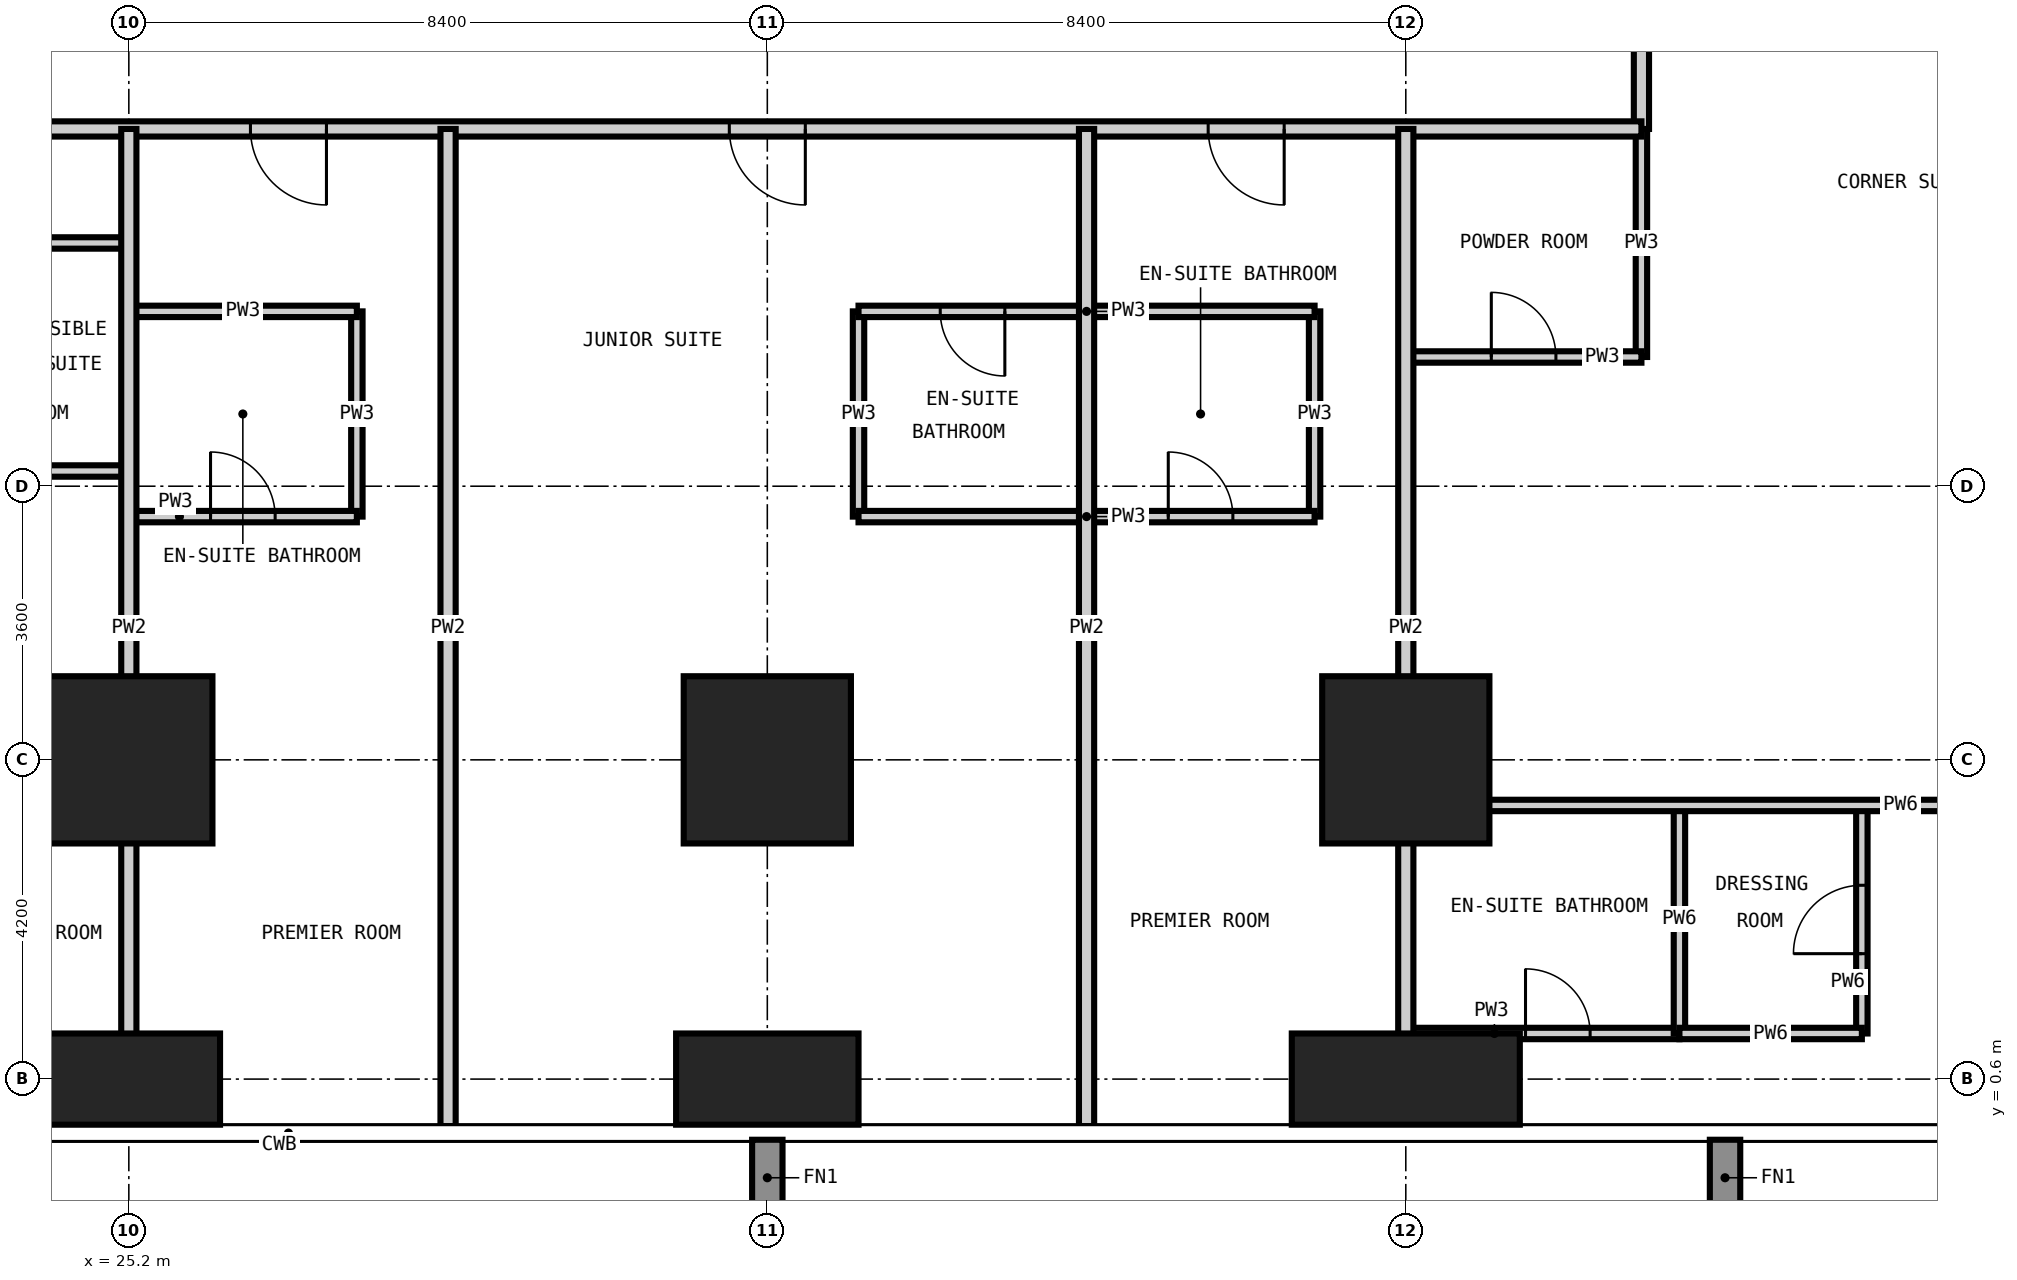
"""IFC4 building model, lengths in metres.
Left out: names, types, materials, properties, quantities, classifications, styles, units other than length and angle.
Written with IfcOpenShell. Run it as: python <this file> out.ifc"""

import sys

from ifc_helpers import new_model, si_unit, direction, frame, frame_2d, origin, origin_2d, place, context, subcontext, project, spatial, rectangle, extrude, element, fill, save


model = new_model("IFC4")
c1 = context("Model", 3, precision=1e-05, world=origin(), true_north=direction((0.0, 1.0)))
c2 = subcontext(c1, "Body", "Model", "MODEL_VIEW")
j1 = project(units=[si_unit("LENGTHUNIT", "METRE"), si_unit("PLANEANGLEUNIT", "RADIAN")], contexts=[c1])
p1 = place(None, origin())
s1 = spatial("IfcSite", under=j1, at=p1, CompositionType="ELEMENT")
p2 = place(p1, origin())
s2 = spatial("IfcBuilding", under=s1, at=p2, CompositionType="ELEMENT")
p3 = place(p2, frame((0.0, 0.0, 144.0)))
s3 = spatial("IfcBuildingStorey", under=s2, at=p3, CompositionType="ELEMENT", Elevation=144.0)
p4 = place(p3, frame((25.2, 0.6, -0.35), z_axis=(0.0, 0.0, 1.0), x_axis=(1.0, 0.0, 0.0)))
e1 = element("IfcColumn", 1, at=p4, inside=s3, PredefinedType="COLUMN", context=c2, shape_type="SweptSolid", body=[
    extrude(rectangle(XDim=2.4, YDim=1.2, at=origin_2d()), origin(), (0.0, 0.0, 1.0), 3.6),
])
p5 = place(p3, frame((25.2, 4.8, -0.35), z_axis=(0.0, 0.0, 1.0), x_axis=(1.0, 0.0, 0.0)))
e2 = element("IfcColumn", 2, at=p5, inside=s3, PredefinedType="COLUMN", context=c2, shape_type="SweptSolid", body=[
    extrude(rectangle(XDim=2.2, YDim=2.2, at=origin_2d()), origin(), (0.0, 0.0, 1.0), 3.6),
])
p6 = place(p3, frame((33.6, 0.6, -0.35), z_axis=(0.0, 0.0, 1.0), x_axis=(1.0, 0.0, 0.0)))
e3 = element("IfcColumn", 3, at=p6, inside=s3, PredefinedType="COLUMN", context=c2, shape_type="SweptSolid", body=[
    extrude(rectangle(XDim=2.4, YDim=1.2, at=origin_2d()), origin(), (0.0, 0.0, 1.0), 3.6),
])
p7 = place(p3, frame((33.6, 4.8, -0.35), z_axis=(0.0, 0.0, 1.0), x_axis=(1.0, 0.0, 0.0)))
e4 = element("IfcColumn", 4, at=p7, inside=s3, PredefinedType="COLUMN", context=c2, shape_type="SweptSolid", body=[
    extrude(rectangle(XDim=2.2, YDim=2.2, at=origin_2d()), origin(), (0.0, 0.0, 1.0), 3.6),
])
p8 = place(p3, frame((42.0, 0.6, -0.35), z_axis=(0.0, 0.0, 1.0), x_axis=(1.0, 0.0, 0.0)))
e5 = element("IfcColumn", 5, at=p8, inside=s3, PredefinedType="COLUMN", context=c2, shape_type="SweptSolid", body=[
    extrude(rectangle(XDim=3.0, YDim=1.2, at=origin_2d()), origin(), (0.0, 0.0, 1.0), 3.6),
])
p9 = place(p3, frame((42.0, 4.8, -0.35), z_axis=(0.0, 0.0, 1.0), x_axis=(1.0, 0.0, 0.0)))
e6 = element("IfcColumn", 6, at=p9, inside=s3, PredefinedType="COLUMN", context=c2, shape_type="SweptSolid", body=[
    extrude(rectangle(XDim=2.2, YDim=2.2, at=origin_2d()), origin(), (0.0, 0.0, 1.0), 3.6),
])
for number, where, z_axis, x_axis in (
    (7, (28.2, 8.0, 0.0), (0.0, 0.0, 1.0), (0.0, 1.0, 0.0)),
    (8, (34.8, 8.0, 0.0), (0.0, 0.0, 1.0), (0.0, 1.0, 0.0)),
    (9, (40.8, 8.0, 0.0), (0.0, 0.0, 1.0), (0.0, 1.0, 0.0)),
):
    element("IfcWall", number, at=place(p3, frame(where, z_axis=z_axis, x_axis=x_axis)), inside=s3, PredefinedType="PARTITIONING", context=c2, shape_type="SweptSolid", body=[
        extrude(rectangle(XDim=2.7, YDim=0.15, at=frame_2d((1.35, 0.0))), origin(), (0.0, 0.0, 1.0), 3.25),
    ])
p10 = place(p3, frame((45.1, 10.1, 0.0), z_axis=(0.0, 0.0, 1.0), x_axis=(0.0, 1.0, 0.0)))
e10 = element("IfcWall", 10, at=p10, inside=s3, PredefinedType="PARTITIONING", context=c2, shape_type="SweptSolid", body=[
    extrude(rectangle(XDim=3.0, YDim=0.15, at=frame_2d((1.5, 0.0))), origin(), (0.0, 0.0, 1.0), 3.25),
])
p11 = place(p3, frame((42.0, 1.2, 0.0), z_axis=(0.0, 0.0, 1.0), x_axis=(1.0, 0.0, 0.0)))
e11 = element("IfcWall", 11, at=p11, inside=s3, PredefinedType="PARTITIONING", context=c2, shape_type="SweptSolid", body=[
    extrude(rectangle(XDim=3.6, YDim=0.15, at=frame_2d((1.8, 0.0))), origin(), (0.0, 0.0, 1.0), 3.25),
])
p12 = place(p11, frame((1.575, 0.0, 0.0)))
e12 = element("IfcOpeningElement", 12, at=p12, cuts=e11, PredefinedType="OPENING", context=c2, shape_type="SweptSolid", body=[
    extrude(rectangle(XDim=0.85, YDim=2.1, at=frame_2d((0.425, 1.05))), frame((0.0, 0.085, 0.0), z_axis=(0.0, -1.0, 0.0), x_axis=(1.0, 0.0, 0.0)), (0.0, 0.0, 1.0), 0.17),
])
p13 = place(p3, frame((25.2, 8.0, 0.0), z_axis=(0.0, 0.0, 1.0), x_axis=(1.0, 0.0, 0.0)))
e13 = element("IfcWall", 13, at=p13, inside=s3, PredefinedType="PARTITIONING", context=c2, shape_type="SweptSolid", body=[
    extrude(rectangle(XDim=3.0, YDim=0.15, at=frame_2d((1.5, 0.0))), origin(), (0.0, 0.0, 1.0), 3.25),
])
p14 = place(p13, frame((1.075, 0.0, 0.0)))
e14 = element("IfcOpeningElement", 14, at=p14, cuts=e13, PredefinedType="OPENING", context=c2, shape_type="SweptSolid", body=[
    extrude(rectangle(XDim=0.85, YDim=2.1, at=frame_2d((0.425, 1.05))), frame((0.0, 0.085, 0.0), z_axis=(0.0, -1.0, 0.0), x_axis=(1.0, 0.0, 0.0)), (0.0, 0.0, 1.0), 0.17),
])
p15 = place(p3, frame((34.8, 8.0, 0.0), z_axis=(0.0, 0.0, 1.0), x_axis=(1.0, 0.0, 0.0)))
e15 = element("IfcWall", 15, at=p15, inside=s3, PredefinedType="PARTITIONING", context=c2, shape_type="SweptSolid", body=[
    extrude(rectangle(XDim=6.0, YDim=0.15, at=frame_2d((3.0, 0.0))), origin(), (0.0, 0.0, 1.0), 3.25),
])
p16 = place(p15, frame((4.075, 0.0, 0.0)))
e16 = element("IfcOpeningElement", 16, at=p16, cuts=e15, PredefinedType="OPENING", context=c2, shape_type="SweptSolid", body=[
    extrude(rectangle(XDim=0.85, YDim=2.1, at=frame_2d((0.425, 1.05))), frame((0.0, 0.085, 0.0), z_axis=(0.0, -1.0, 0.0), x_axis=(1.0, 0.0, 0.0)), (0.0, 0.0, 1.0), 0.17),
])
p17 = place(p3, frame((22.5, 8.6, 0.0), z_axis=(0.0, 0.0, 1.0), x_axis=(1.0, 0.0, 0.0)))
e17 = element("IfcWall", 17, at=p17, inside=s3, PredefinedType="PARTITIONING", context=c2, shape_type="SweptSolid", body=[
    extrude(rectangle(XDim=2.7, YDim=0.15, at=frame_2d((1.35, 0.0))), origin(), (0.0, 0.0, 1.0), 3.25),
])
p18 = place(p3, frame((42.0, 10.1, 0.0), z_axis=(0.0, 0.0, 1.0), x_axis=(1.0, 0.0, 0.0)))
e18 = element("IfcWall", 18, at=p18, inside=s3, PredefinedType="PARTITIONING", context=c2, shape_type="SweptSolid", body=[
    extrude(rectangle(XDim=3.1, YDim=0.15, at=frame_2d((1.55, 0.0))), origin(), (0.0, 0.0, 1.0), 3.25),
])
p19 = place(p18, frame((1.125, 0.0, 0.0)))
e19 = element("IfcOpeningElement", 19, at=p19, cuts=e18, PredefinedType="OPENING", context=c2, shape_type="SweptSolid", body=[
    extrude(rectangle(XDim=0.85, YDim=2.1, at=frame_2d((0.425, 1.05))), frame((0.0, 0.085, 0.0), z_axis=(0.0, -1.0, 0.0), x_axis=(1.0, 0.0, 0.0)), (0.0, 0.0, 1.0), 0.17),
])
p20 = place(p3, frame((25.2, 10.7, 0.0), z_axis=(0.0, 0.0, 1.0), x_axis=(1.0, 0.0, 0.0)))
e20 = element("IfcWall", 20, at=p20, inside=s3, PredefinedType="PARTITIONING", context=c2, shape_type="SweptSolid", body=[
    extrude(rectangle(XDim=3.0, YDim=0.15, at=frame_2d((1.5, 0.0))), origin(), (0.0, 0.0, 1.0), 3.25),
])
p21 = place(p3, frame((34.8, 10.7, 0.0), z_axis=(0.0, 0.0, 1.0), x_axis=(1.0, 0.0, 0.0)))
e21 = element("IfcWall", 21, at=p21, inside=s3, PredefinedType="PARTITIONING", context=c2, shape_type="SweptSolid", body=[
    extrude(rectangle(XDim=6.0, YDim=0.15, at=frame_2d((3.0, 0.0))), origin(), (0.0, 0.0, 1.0), 3.25),
])
p22 = place(p21, frame((1.075, 0.0, 0.0)))
e22 = element("IfcOpeningElement", 22, at=p22, cuts=e21, PredefinedType="OPENING", context=c2, shape_type="SweptSolid", body=[
    extrude(rectangle(XDim=0.85, YDim=2.1, at=frame_2d((0.425, 1.05))), frame((0.0, 0.085, 0.0), z_axis=(0.0, -1.0, 0.0), x_axis=(1.0, 0.0, 0.0)), (0.0, 0.0, 1.0), 0.17),
])
p23 = place(p3, frame((22.5, 11.6, 0.0), z_axis=(0.0, 0.0, 1.0), x_axis=(1.0, 0.0, 0.0)))
e23 = element("IfcWall", 23, at=p23, inside=s3, PredefinedType="PARTITIONING", context=c2, shape_type="SweptSolid", body=[
    extrude(rectangle(XDim=2.7, YDim=0.15, at=frame_2d((1.35, 0.0))), origin(), (0.0, 0.0, 1.0), 3.25),
])
p24 = place(p3, frame((45.1, 44.5, 0.0), z_axis=(0.0, 0.0, 1.0), x_axis=(0.0, -1.0, 0.0)))
e24 = element("IfcWall", 24, at=p24, inside=s3, PredefinedType="PARTITIONING", context=c2, shape_type="SweptSolid", body=[
    extrude(rectangle(XDim=31.4, YDim=0.2, at=frame_2d((15.7, 0.0))), origin(), (0.0, 0.0, 1.0), 3.25),
])
p25 = place(p24, frame((24.2, 0.0, 0.0)))
e25 = element("IfcOpeningElement", 25, at=p25, cuts=e24, PredefinedType="OPENING", context=c2, shape_type="SweptSolid", body=[
    extrude(rectangle(XDim=1.0, YDim=2.2, at=frame_2d((0.5, 1.1))), frame((0.0, 0.11, 0.0), z_axis=(0.0, -1.0, 0.0), x_axis=(1.0, 0.0, 0.0)), (0.0, 0.0, 1.0), 0.22),
])
p26 = place(p24, frame((13.4, 0.0, 0.0)))
e26 = element("IfcOpeningElement", 26, at=p26, cuts=e24, PredefinedType="OPENING", context=c2, shape_type="SweptSolid", body=[
    extrude(rectangle(XDim=1.0, YDim=2.2, at=frame_2d((0.5, 1.1))), frame((0.0, 0.11, 0.0), z_axis=(0.0, -1.0, 0.0), x_axis=(1.0, 0.0, 0.0)), (0.0, 0.0, 1.0), 0.22),
])
p27 = place(p24, frame((7.4, 0.0, 0.0)))
e27 = element("IfcOpeningElement", 27, at=p27, cuts=e24, PredefinedType="OPENING", context=c2, shape_type="SweptSolid", body=[
    extrude(rectangle(XDim=1.0, YDim=2.2, at=frame_2d((0.5, 1.1))), frame((0.0, 0.11, 0.0), z_axis=(0.0, -1.0, 0.0), x_axis=(1.0, 0.0, 0.0)), (0.0, 0.0, 1.0), 0.22),
])
p28 = place(p24, frame((29.05, 0.0, 0.0)))
e28 = element("IfcOpeningElement", 28, at=p28, cuts=e24, PredefinedType="OPENING", context=c2, shape_type="SweptSolid", body=[
    extrude(rectangle(XDim=1.0, YDim=2.2, at=frame_2d((0.5, 1.1))), frame((0.0, 0.11, 0.0), z_axis=(0.0, -1.0, 0.0), x_axis=(1.0, 0.0, 0.0)), (0.0, 0.0, 1.0), 0.22),
])
p29 = place(p24, frame((0.75, 0.0, 0.0)))
e29 = element("IfcOpeningElement", 29, at=p29, cuts=e24, PredefinedType="OPENING", context=c2, shape_type="SweptSolid", body=[
    extrude(rectangle(XDim=1.0, YDim=2.2, at=frame_2d((0.5, 1.1))), frame((0.0, 0.11, 0.0), z_axis=(0.0, -1.0, 0.0), x_axis=(1.0, 0.0, 0.0)), (0.0, 0.0, 1.0), 0.22),
])
p30 = place(p3, frame((45.1, 13.1, 0.0), z_axis=(0.0, 0.0, 1.0), x_axis=(-1.0, 0.0, 0.0)))
e30 = element("IfcWall", 30, at=p30, inside=s3, PredefinedType="PARTITIONING", context=c2, shape_type="SweptSolid", body=[
    extrude(rectangle(XDim=24.1, YDim=0.2, at=frame_2d((12.05, 0.0))), origin(), (0.0, 0.0, 1.0), 3.25),
])
p31 = place(p30, frame((21.5, 0.0, 0.0)))
e31 = element("IfcOpeningElement", 31, at=p31, cuts=e30, PredefinedType="OPENING", context=c2, shape_type="SweptSolid", body=[
    extrude(rectangle(XDim=1.0, YDim=2.2, at=frame_2d((0.5, 1.1))), frame((0.0, 0.11, 0.0), z_axis=(0.0, -1.0, 0.0), x_axis=(1.0, 0.0, 0.0)), (0.0, 0.0, 1.0), 0.22),
])
p32 = place(p30, frame((17.3, 0.0, 0.0)))
e32 = element("IfcOpeningElement", 32, at=p32, cuts=e30, PredefinedType="OPENING", context=c2, shape_type="SweptSolid", body=[
    extrude(rectangle(XDim=1.0, YDim=2.2, at=frame_2d((0.5, 1.1))), frame((0.0, 0.11, 0.0), z_axis=(0.0, -1.0, 0.0), x_axis=(1.0, 0.0, 0.0)), (0.0, 0.0, 1.0), 0.22),
])
p33 = place(p30, frame((11.0, 0.0, 0.0)))
e33 = element("IfcOpeningElement", 33, at=p33, cuts=e30, PredefinedType="OPENING", context=c2, shape_type="SweptSolid", body=[
    extrude(rectangle(XDim=1.0, YDim=2.2, at=frame_2d((0.5, 1.1))), frame((0.0, 0.11, 0.0), z_axis=(0.0, -1.0, 0.0), x_axis=(1.0, 0.0, 0.0)), (0.0, 0.0, 1.0), 0.22),
])
p34 = place(p30, frame((4.7, 0.0, 0.0)))
e34 = element("IfcOpeningElement", 34, at=p34, cuts=e30, PredefinedType="OPENING", context=c2, shape_type="SweptSolid", body=[
    extrude(rectangle(XDim=1.0, YDim=2.2, at=frame_2d((0.5, 1.1))), frame((0.0, 0.11, 0.0), z_axis=(0.0, -1.0, 0.0), x_axis=(1.0, 0.0, 0.0)), (0.0, 0.0, 1.0), 0.22),
])
for number, where, z_axis, x_axis in (
    (35, (25.2, -0.018, 0.0), (0.0, 0.0, 1.0), (0.0, 1.0, 0.0)),
    (36, (29.4, -0.018, 0.0), (0.0, 0.0, 1.0), (0.0, 1.0, 0.0)),
    (37, (37.8, -0.018, 0.0), (0.0, 0.0, 1.0), (0.0, 1.0, 0.0)),
    (38, (42.0, -0.018, 0.0), (0.0, 0.0, 1.0), (0.0, 1.0, 0.0)),
):
    element("IfcWall", number, at=place(p3, frame(where, z_axis=z_axis, x_axis=x_axis)), inside=s3, PredefinedType="PARTITIONING", context=c2, shape_type="SweptSolid", body=[
        extrude(rectangle(XDim=13.118, YDim=0.2, at=frame_2d((6.559, 0.0))), origin(), (0.0, 0.0, 1.0), 3.25),
    ])
p35 = place(p3, frame((45.6, 1.2, 0.0), z_axis=(0.0, 0.0, 1.0), x_axis=(0.0, 1.0, 0.0)))
e39 = element("IfcWall", 39, at=p35, inside=s3, PredefinedType="PARTITIONING", context=c2, shape_type="SweptSolid", body=[
    extrude(rectangle(XDim=3.0, YDim=0.15, at=frame_2d((1.5, 0.0))), origin(), (0.0, 0.0, 1.0), 3.25),
])
p36 = place(p3, frame((48.0, 1.2, 0.0), z_axis=(0.0, 0.0, 1.0), x_axis=(0.0, 1.0, 0.0)))
e40 = element("IfcWall", 40, at=p36, inside=s3, PredefinedType="PARTITIONING", context=c2, shape_type="SweptSolid", body=[
    extrude(rectangle(XDim=3.0, YDim=0.15, at=frame_2d((1.5, 0.0))), origin(), (0.0, 0.0, 1.0), 3.25),
])
p37 = place(p36, frame((1.05, 0.0, 0.0)))
e41 = element("IfcOpeningElement", 41, at=p37, cuts=e40, PredefinedType="OPENING", context=c2, shape_type="SweptSolid", body=[
    extrude(rectangle(XDim=0.9, YDim=2.1, at=frame_2d((0.45, 1.05))), frame((0.0, 0.085, 0.0), z_axis=(0.0, -1.0, 0.0), x_axis=(1.0, 0.0, 0.0)), (0.0, 0.0, 1.0), 0.17),
])
p38 = place(p3, frame((45.6, 1.2, 0.0), z_axis=(0.0, 0.0, 1.0), x_axis=(1.0, 0.0, 0.0)))
e42 = element("IfcWall", 42, at=p38, inside=s3, PredefinedType="PARTITIONING", context=c2, shape_type="SweptSolid", body=[
    extrude(rectangle(XDim=2.4, YDim=0.15, at=frame_2d((1.2, 0.0))), origin(), (0.0, 0.0, 1.0), 3.25),
])
p39 = place(p3, frame((42.0, 4.2, 0.0), z_axis=(0.0, 0.0, 1.0), x_axis=(1.0, 0.0, 0.0)))
e43 = element("IfcWall", 43, at=p39, inside=s3, PredefinedType="PARTITIONING", context=c2, shape_type="SweptSolid", body=[
    extrude(rectangle(XDim=12.618, YDim=0.15, at=frame_2d((6.309, 0.0))), origin(), (0.0, 0.0, 1.0), 3.25),
])
p40 = place(p39, frame((9.55, 0.0, 0.0)))
e44 = element("IfcOpeningElement", 44, at=p40, cuts=e43, PredefinedType="OPENING", context=c2, shape_type="SweptSolid", body=[
    extrude(rectangle(XDim=0.9, YDim=2.1, at=frame_2d((0.45, 1.05))), frame((0.0, 0.085, 0.0), z_axis=(0.0, -1.0, 0.0), x_axis=(1.0, 0.0, 0.0)), (0.0, 0.0, 1.0), 0.17),
])
p41 = place(p32, origin())
e45 = element("IfcDoor", 45, at=p41, inside=s3, OperationType="SINGLE_SWING_LEFT", PredefinedType="DOOR", context=c2, shape_type="SweptSolid", body=[
    extrude(rectangle(XDim=1.0, YDim=2.2, at=frame_2d((0.5, 1.1))), frame((0.0, 0.025, 0.0), z_axis=(0.0, -1.0, 0.0), x_axis=(1.0, 0.0, 0.0)), (0.0, 0.0, 1.0), 0.05),
])
fill(e32, e45)
p42 = place(p14, origin())
e46 = element("IfcDoor", 46, at=p42, inside=s3, OperationType="SINGLE_SWING_LEFT", PredefinedType="DOOR", context=c2, shape_type="SweptSolid", body=[
    extrude(rectangle(XDim=0.85, YDim=2.1, at=frame_2d((0.425, 1.05))), frame((0.0, 0.025, 0.0), z_axis=(0.0, -1.0, 0.0), x_axis=(1.0, 0.0, 0.0)), (0.0, 0.0, 1.0), 0.05),
])
fill(e14, e46)
p43 = place(p33, origin())
e47 = element("IfcDoor", 47, at=p43, inside=s3, OperationType="SINGLE_SWING_LEFT", PredefinedType="DOOR", context=c2, shape_type="SweptSolid", body=[
    extrude(rectangle(XDim=1.0, YDim=2.2, at=frame_2d((0.5, 1.1))), frame((0.0, 0.025, 0.0), z_axis=(0.0, -1.0, 0.0), x_axis=(1.0, 0.0, 0.0)), (0.0, 0.0, 1.0), 0.05),
])
fill(e33, e47)
p44 = place(p22, frame((0.85, 0.0, 0.0), z_axis=(0.0, 0.0, 1.0), x_axis=(-1.0, 0.0, 0.0)))
e48 = element("IfcDoor", 48, at=p44, inside=s3, OperationType="SINGLE_SWING_LEFT", PredefinedType="DOOR", context=c2, shape_type="SweptSolid", body=[
    extrude(rectangle(XDim=0.85, YDim=2.1, at=frame_2d((0.425, 1.05))), frame((0.0, 0.025, 0.0), z_axis=(0.0, -1.0, 0.0), x_axis=(1.0, 0.0, 0.0)), (0.0, 0.0, 1.0), 0.05),
])
fill(e22, e48)
p45 = place(p34, origin())
e49 = element("IfcDoor", 49, at=p45, inside=s3, OperationType="SINGLE_SWING_LEFT", PredefinedType="DOOR", context=c2, shape_type="SweptSolid", body=[
    extrude(rectangle(XDim=1.0, YDim=2.2, at=frame_2d((0.5, 1.1))), frame((0.0, 0.025, 0.0), z_axis=(0.0, -1.0, 0.0), x_axis=(1.0, 0.0, 0.0)), (0.0, 0.0, 1.0), 0.05),
])
fill(e34, e49)
p46 = place(p16, origin())
e50 = element("IfcDoor", 50, at=p46, inside=s3, OperationType="SINGLE_SWING_LEFT", PredefinedType="DOOR", context=c2, shape_type="SweptSolid", body=[
    extrude(rectangle(XDim=0.85, YDim=2.1, at=frame_2d((0.425, 1.05))), frame((0.0, 0.025, 0.0), z_axis=(0.0, -1.0, 0.0), x_axis=(1.0, 0.0, 0.0)), (0.0, 0.0, 1.0), 0.05),
])
fill(e16, e50)
p47 = place(p19, origin())
e51 = element("IfcDoor", 51, at=p47, inside=s3, OperationType="SINGLE_SWING_LEFT", PredefinedType="DOOR", context=c2, shape_type="SweptSolid", body=[
    extrude(rectangle(XDim=0.85, YDim=2.1, at=frame_2d((0.425, 1.05))), frame((0.0, 0.025, 0.0), z_axis=(0.0, -1.0, 0.0), x_axis=(1.0, 0.0, 0.0)), (0.0, 0.0, 1.0), 0.05),
])
fill(e19, e51)
p48 = place(p12, origin())
e52 = element("IfcDoor", 52, at=p48, inside=s3, OperationType="SINGLE_SWING_LEFT", PredefinedType="DOOR", context=c2, shape_type="SweptSolid", body=[
    extrude(rectangle(XDim=0.85, YDim=2.1, at=frame_2d((0.425, 1.05))), frame((0.0, 0.025, 0.0), z_axis=(0.0, -1.0, 0.0), x_axis=(1.0, 0.0, 0.0)), (0.0, 0.0, 1.0), 0.05),
])
fill(e12, e52)
p49 = place(p37, origin())
e53 = element("IfcDoor", 53, at=p49, inside=s3, OperationType="SINGLE_SWING_LEFT", PredefinedType="DOOR", context=c2, shape_type="SweptSolid", body=[
    extrude(rectangle(XDim=0.9, YDim=2.1, at=frame_2d((0.45, 1.05))), frame((0.0, 0.025, 0.0), z_axis=(0.0, -1.0, 0.0), x_axis=(1.0, 0.0, 0.0)), (0.0, 0.0, 1.0), 0.05),
])
fill(e41, e53)
save(model, sys.argv[1])
